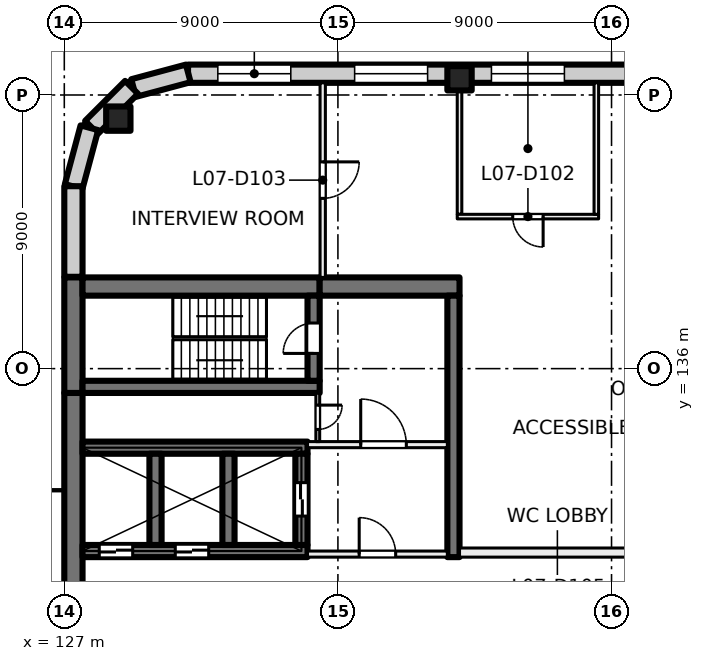
"""IFC4 building model, lengths in metres.
Left out: names, types, materials, properties, quantities, classifications, styles, units other than length and angle.
Written with IfcOpenShell. Run it as: python <this file> out.ifc"""

import sys

from ifc_helpers import new_model, si_unit, direction, frame, frame_2d, origin, origin_2d, place, context, subcontext, project, spatial, rectangle, extrude, element, fill, save


model = new_model("IFC4")
c1 = context("Model", 3, precision=1e-05, world=origin(), true_north=direction((0.0, 1.0)))
c2 = subcontext(c1, "Body", "Model", "MODEL_VIEW")
j1 = project(units=[si_unit("LENGTHUNIT", "METRE"), si_unit("PLANEANGLEUNIT", "RADIAN")], contexts=[c1])
p1 = place(None, origin())
s1 = spatial("IfcSite", under=j1, at=p1, CompositionType="ELEMENT")
p2 = place(p1, origin())
s2 = spatial("IfcBuilding", under=s1, at=p2, CompositionType="ELEMENT")
p3 = place(p2, frame((0.0, 0.0, 35.5)))
s3 = spatial("IfcBuildingStorey", under=s2, at=p3, CompositionType="ELEMENT", Elevation=35.5)
for number, where, z_axis, x_axis in (
    (1, (128.777, 144.223, 0.0), (0.0, 0.0, 1.0), (1.0, 0.0, 0.0)),
    (2, (140.0, 145.55, 0.0), (0.0, 0.0, 1.0), (1.0, 0.0, 0.0)),
):
    element("IfcColumn", number, at=place(p3, frame(where, z_axis=z_axis, x_axis=x_axis)), inside=s3, PredefinedType="COLUMN", context=c2, shape_type="SweptSolid", body=[
        extrude(rectangle(XDim=0.8, YDim=0.8, at=origin_2d()), origin(), (0.0, 0.0, 1.0), 4.0),
    ])
p4 = place(p3, frame((127.3, 120.8, 0.0), z_axis=(0.0, 0.0, 1.0), x_axis=(0.0, 1.0, 0.0)))
e3 = element("IfcWall", 3, at=p4, inside=s3, PredefinedType="SHEAR", context=c2, shape_type="SweptSolid", body=[
    extrude(rectangle(XDim=14.4, YDim=0.6, at=frame_2d((7.2, 0.0))), origin(), (0.0, 0.0, 1.0), 4.0),
])
p5 = place(p3, frame((127.3, 135.2, 0.0), z_axis=(0.0, 0.0, 1.0), x_axis=(0.0, 1.0, 0.0)))
e4 = element("IfcWall", 4, at=p5, inside=s3, PredefinedType="SHEAR", context=c2, shape_type="SweptSolid", body=[
    extrude(rectangle(XDim=3.8, YDim=0.6, at=frame_2d((1.9, 0.0))), origin(), (0.0, 0.0, 1.0), 4.0),
])
p6 = place(p3, frame((127.6, 138.7, 0.0), z_axis=(0.0, 0.0, 1.0), x_axis=(1.0, 0.0, 0.0)))
e5 = element("IfcWall", 5, at=p6, inside=s3, PredefinedType="SHEAR", context=c2, shape_type="SweptSolid", body=[
    extrude(rectangle(XDim=7.8, YDim=0.6, at=frame_2d((3.9, 0.0))), origin(), (0.0, 0.0, 1.0), 4.0),
])
p7 = place(p3, frame((135.4, 138.7, 0.0), z_axis=(0.0, 0.0, 1.0), x_axis=(1.0, 0.0, 0.0)))
e6 = element("IfcWall", 6, at=p7, inside=s3, PredefinedType="SHEAR", context=c2, shape_type="SweptSolid", body=[
    extrude(rectangle(XDim=4.6, YDim=0.6, at=frame_2d((2.3, 0.0))), origin(), (0.0, 0.0, 1.0), 4.0),
])
p8 = place(p3, frame((127.6, 135.4, 0.0), z_axis=(0.0, 0.0, 1.0), x_axis=(1.0, 0.0, 0.0)))
e7 = element("IfcWall", 7, at=p8, inside=s3, PredefinedType="SHEAR", context=c2, shape_type="SweptSolid", body=[
    extrude(rectangle(XDim=7.8, YDim=0.4, at=frame_2d((3.9, 0.0))), origin(), (0.0, 0.0, 1.0), 4.0),
])
p9 = place(p3, frame((135.2, 135.6, 0.0), z_axis=(0.0, 0.0, 1.0), x_axis=(0.0, 1.0, 0.0)))
e8 = element("IfcWall", 8, at=p9, inside=s3, PredefinedType="SHEAR", context=c2, shape_type="SweptSolid", body=[
    extrude(rectangle(XDim=2.8, YDim=0.4, at=frame_2d((1.4, 0.0))), origin(), (0.0, 0.0, 1.0), 4.0),
])
p10 = place(p9, frame((0.9, 0.0, 0.0)))
e9 = element("IfcOpeningElement", 9, at=p10, cuts=e8, PredefinedType="OPENING", context=c2, shape_type="SweptSolid", body=[
    extrude(rectangle(XDim=1.0, YDim=2.1, at=frame_2d((0.5, 1.05))), frame((0.0, 0.21, 0.0), z_axis=(0.0, -1.0, 0.0), x_axis=(1.0, 0.0, 0.0)), (0.0, 0.0, 1.0), 0.42),
])
p11 = place(p3, frame((127.6, 130.0, 0.0), z_axis=(0.0, 0.0, 1.0), x_axis=(1.0, 0.0, 0.0)))
e10 = element("IfcWall", 10, at=p11, inside=s3, PredefinedType="SHEAR", context=c2, shape_type="SweptSolid", body=[
    extrude(rectangle(XDim=7.4, YDim=0.4, at=frame_2d((3.7, 0.0))), origin(), (0.0, 0.0, 1.0), 4.0),
])
p12 = place(p11, frame((0.55, 0.0, 0.0)))
e11 = element("IfcOpeningElement", 11, at=p12, cuts=e10, PredefinedType="OPENING", context=c2, shape_type="SweptSolid", body=[
    extrude(rectangle(XDim=1.1, YDim=2.1, at=frame_2d((0.55, 1.05))), frame((0.0, 0.21, 0.0), z_axis=(0.0, -1.0, 0.0), x_axis=(1.0, 0.0, 0.0)), (0.0, 0.0, 1.0), 0.42),
])
p13 = place(p11, frame((3.05, 0.0, 0.0)))
e12 = element("IfcOpeningElement", 12, at=p13, cuts=e10, PredefinedType="OPENING", context=c2, shape_type="SweptSolid", body=[
    extrude(rectangle(XDim=1.1, YDim=2.1, at=frame_2d((0.55, 1.05))), frame((0.0, 0.21, 0.0), z_axis=(0.0, -1.0, 0.0), x_axis=(1.0, 0.0, 0.0)), (0.0, 0.0, 1.0), 0.42),
])
p14 = place(p3, frame((127.6, 133.4, 0.0), z_axis=(0.0, 0.0, 1.0), x_axis=(1.0, 0.0, 0.0)))
e13 = element("IfcWall", 13, at=p14, inside=s3, PredefinedType="SHEAR", context=c2, shape_type="SweptSolid", body=[
    extrude(rectangle(XDim=7.4, YDim=0.4, at=frame_2d((3.7, 0.0))), origin(), (0.0, 0.0, 1.0), 4.0),
])
for number, where, z_axis, x_axis in (
    (14, (130.0, 130.2, 0.0), (0.0, 0.0, 1.0), (0.0, 1.0, 0.0)),
    (15, (132.4, 130.2, 0.0), (0.0, 0.0, 1.0), (0.0, 1.0, 0.0)),
):
    element("IfcWall", number, at=place(p3, frame(where, z_axis=z_axis, x_axis=x_axis)), inside=s3, PredefinedType="SHEAR", context=c2, shape_type="SweptSolid", body=[
        extrude(rectangle(XDim=3.0, YDim=0.4, at=frame_2d((1.5, 0.0))), origin(), (0.0, 0.0, 1.0), 4.0),
    ])
p15 = place(p3, frame((134.8, 130.2, 0.0), z_axis=(0.0, 0.0, 1.0), x_axis=(0.0, 1.0, 0.0)))
e16 = element("IfcWall", 16, at=p15, inside=s3, PredefinedType="SHEAR", context=c2, shape_type="SweptSolid", body=[
    extrude(rectangle(XDim=3.0, YDim=0.4, at=frame_2d((1.5, 0.0))), origin(), (0.0, 0.0, 1.0), 4.0),
])
p16 = place(p15, frame((0.95, 0.0, 0.0)))
e17 = element("IfcOpeningElement", 17, at=p16, cuts=e16, PredefinedType="OPENING", context=c2, shape_type="SweptSolid", body=[
    extrude(rectangle(XDim=1.1, YDim=2.1, at=frame_2d((0.55, 1.05))), frame((0.0, 0.21, 0.0), z_axis=(0.0, -1.0, 0.0), x_axis=(1.0, 0.0, 0.0)), (0.0, 0.0, 1.0), 0.42),
])
p17 = place(p3, frame((139.8, 129.8, 0.0), z_axis=(0.0, 0.0, 1.0), x_axis=(0.0, 1.0, 0.0)))
e18 = element("IfcWall", 18, at=p17, inside=s3, PredefinedType="SHEAR", context=c2, shape_type="SweptSolid", body=[
    extrude(rectangle(XDim=8.6, YDim=0.4, at=frame_2d((4.3, 0.0))), origin(), (0.0, 0.0, 1.0), 4.0),
])
p18 = place(p3, frame((131.07, 145.7, 0.0), z_axis=(0.0, 0.0, 1.0), x_axis=(1.0, 0.0, 0.0)))
e19 = element("IfcWall", 19, at=p18, inside=s3, PredefinedType="SOLIDWALL", context=c2, shape_type="SweptSolid", body=[
    extrude(rectangle(XDim=31.93, YDim=0.6, at=frame_2d((15.965, 0.0))), origin(), (0.0, 0.0, 1.0), 3.625),
])
p19 = place(p18, frame((0.98, 0.0, 0.9)))
e20 = element("IfcOpeningElement", 20, at=p19, cuts=e19, PredefinedType="OPENING", context=c2, shape_type="SweptSolid", body=[
    extrude(rectangle(XDim=2.4, YDim=2.4, at=frame_2d((1.2, 1.2))), frame((0.0, 0.31, 0.0), z_axis=(0.0, -1.0, 0.0), x_axis=(1.0, 0.0, 0.0)), (0.0, 0.0, 1.0), 0.62),
])
p20 = place(p18, frame((5.48, 0.0, 0.9)))
e21 = element("IfcOpeningElement", 21, at=p20, cuts=e19, PredefinedType="OPENING", context=c2, shape_type="SweptSolid", body=[
    extrude(rectangle(XDim=2.4, YDim=2.4, at=frame_2d((1.2, 1.2))), frame((0.0, 0.31, 0.0), z_axis=(0.0, -1.0, 0.0), x_axis=(1.0, 0.0, 0.0)), (0.0, 0.0, 1.0), 0.62),
])
p21 = place(p18, frame((9.98, 0.0, 0.9)))
e22 = element("IfcOpeningElement", 22, at=p21, cuts=e19, PredefinedType="OPENING", context=c2, shape_type="SweptSolid", body=[
    extrude(rectangle(XDim=2.4, YDim=2.4, at=frame_2d((1.2, 1.2))), frame((0.0, 0.31, 0.0), z_axis=(0.0, -1.0, 0.0), x_axis=(1.0, 0.0, 0.0)), (0.0, 0.0, 1.0), 0.62),
])
p22 = place(p18, frame((14.48, 0.0, 0.9)))
e23 = element("IfcOpeningElement", 23, at=p22, cuts=e19, PredefinedType="OPENING", context=c2, shape_type="SweptSolid", body=[
    extrude(rectangle(XDim=2.4, YDim=2.4, at=frame_2d((1.2, 1.2))), frame((0.0, 0.31, 0.0), z_axis=(0.0, -1.0, 0.0), x_axis=(1.0, 0.0, 0.0)), (0.0, 0.0, 1.0), 0.62),
])
p23 = place(p18, frame((18.98, 0.0, 0.9)))
e24 = element("IfcOpeningElement", 24, at=p23, cuts=e19, PredefinedType="OPENING", context=c2, shape_type="SweptSolid", body=[
    extrude(rectangle(XDim=2.4, YDim=2.4, at=frame_2d((1.2, 1.2))), frame((0.0, 0.31, 0.0), z_axis=(0.0, -1.0, 0.0), x_axis=(1.0, 0.0, 0.0)), (0.0, 0.0, 1.0), 0.62),
])
p24 = place(p18, frame((23.48, 0.0, 0.9)))
e25 = element("IfcOpeningElement", 25, at=p24, cuts=e19, PredefinedType="OPENING", context=c2, shape_type="SweptSolid", body=[
    extrude(rectangle(XDim=2.4, YDim=2.4, at=frame_2d((1.2, 1.2))), frame((0.0, 0.31, 0.0), z_axis=(0.0, -1.0, 0.0), x_axis=(1.0, 0.0, 0.0)), (0.0, 0.0, 1.0), 0.62),
])
p25 = place(p18, frame((27.98, 0.0, 0.9)))
e26 = element("IfcOpeningElement", 26, at=p25, cuts=e19, PredefinedType="OPENING", context=c2, shape_type="SweptSolid", body=[
    extrude(rectangle(XDim=2.4, YDim=2.4, at=frame_2d((1.2, 1.2))), frame((0.0, 0.31, 0.0), z_axis=(0.0, -1.0, 0.0), x_axis=(1.0, 0.0, 0.0)), (0.0, 0.0, 1.0), 0.62),
])
for number, where, z_axis, x_axis in (
    (27, (129.281, 145.229, 0.0), (0.0, 0.0, 1.0), (0.966, 0.259, 0.0)),
    (28, (127.896, 143.936, 0.0), (0.0, 0.0, 1.0), (0.707, 0.707, 0.0)),
):
    element("IfcWall", number, at=place(p3, frame(where, z_axis=z_axis, x_axis=x_axis)), inside=s3, PredefinedType="SOLIDWALL", context=c2, shape_type="SweptSolid", body=[
        extrude(rectangle(XDim=1.861, YDim=0.6, at=frame_2d((0.93, 0.0))), origin(), (0.0, 0.0, 1.0), 3.625),
    ])
p26 = place(p3, frame((127.308, 141.99, 0.0), z_axis=(0.0, 0.0, 1.0), x_axis=(0.258839784042, 0.965920269068, 0.0)))
e29 = element("IfcWall", 29, at=p26, inside=s3, PredefinedType="SOLIDWALL", context=c2, shape_type="SweptSolid", body=[
    extrude(rectangle(XDim=2.0, YDim=0.6, at=frame_2d((1.0, 0.0))), origin(), (0.0, 0.0, 1.0), 3.625),
])
p27 = place(p3, frame((127.3, 139.02, 0.0), z_axis=(0.0, 0.0, 1.0), x_axis=(0.0, 1.0, 0.0)))
e30 = element("IfcWall", 30, at=p27, inside=s3, PredefinedType="SOLIDWALL", context=c2, shape_type="SweptSolid", body=[
    extrude(rectangle(XDim=2.98, YDim=0.6, at=frame_2d((1.49, 0.0))), origin(), (0.0, 0.0, 1.0), 3.625),
])
p28 = place(p3, frame((135.0, 129.9, 0.0), z_axis=(0.0, 0.0, 1.0), x_axis=(1.0, 0.0, 0.0)))
e31 = element("IfcWall", 31, at=p28, inside=s3, PredefinedType="PARTITIONING", context=c2, shape_type="SweptSolid", body=[
    extrude(rectangle(XDim=4.6, YDim=0.2, at=frame_2d((2.3, 0.0))), origin(), (0.0, 0.0, 1.0), 3.625),
])
p29 = place(p28, frame((1.7, 0.0, 0.0)))
e32 = element("IfcOpeningElement", 32, at=p29, cuts=e31, PredefinedType="OPENING", context=c2, shape_type="SweptSolid", body=[
    extrude(rectangle(XDim=1.2, YDim=2.1, at=frame_2d((0.6, 1.05))), frame((0.0, 0.11, 0.0), z_axis=(0.0, -1.0, 0.0), x_axis=(1.0, 0.0, 0.0)), (0.0, 0.0, 1.0), 0.22),
])
p30 = place(p3, frame((135.0, 133.5, 0.0), z_axis=(0.0, 0.0, 1.0), x_axis=(1.0, 0.0, 0.0)))
e33 = element("IfcWall", 33, at=p30, inside=s3, PredefinedType="PARTITIONING", context=c2, shape_type="SweptSolid", body=[
    extrude(rectangle(XDim=4.6, YDim=0.2, at=frame_2d((2.3, 0.0))), origin(), (0.0, 0.0, 1.0), 3.625),
])
p31 = place(p30, frame((1.75, 0.0, 0.0)))
e34 = element("IfcOpeningElement", 34, at=p31, cuts=e33, PredefinedType="OPENING", context=c2, shape_type="SweptSolid", body=[
    extrude(rectangle(XDim=1.5, YDim=2.1, at=frame_2d((0.75, 1.05))), frame((0.0, 0.11, 0.0), z_axis=(0.0, -1.0, 0.0), x_axis=(1.0, 0.0, 0.0)), (0.0, 0.0, 1.0), 0.22),
])
p32 = place(p3, frame((135.337, 135.2, 0.0), z_axis=(0.0, 0.0, 1.0), x_axis=(0.0, -1.0, 0.0)))
e35 = element("IfcWall", 35, at=p32, inside=s3, PredefinedType="PARTITIONING", context=c2, shape_type="SweptSolid", body=[
    extrude(rectangle(XDim=1.6, YDim=0.125, at=frame_2d((0.8, 0.0))), origin(), (0.0, 0.0, 1.0), 3.625),
])
p33 = place(p32, frame((0.4, 0.0, 0.0)))
e36 = element("IfcOpeningElement", 36, at=p33, cuts=e35, PredefinedType="OPENING", context=c2, shape_type="SweptSolid", body=[
    extrude(rectangle(XDim=0.8, YDim=2.1, at=frame_2d((0.4, 1.05))), frame((0.0, 0.073, 0.0), z_axis=(0.0, -1.0, 0.0), x_axis=(1.0, 0.0, 0.0)), (0.0, 0.0, 1.0), 0.145),
])
p34 = place(p3, frame((135.5, 145.4, 0.0), z_axis=(0.0, 0.0, 1.0), x_axis=(0.0, -1.0, 0.0)))
e37 = element("IfcWall", 37, at=p34, inside=s3, PredefinedType="PARTITIONING", context=c2, shape_type="SweptSolid", body=[
    extrude(rectangle(XDim=6.4, YDim=0.175, at=frame_2d((3.2, 0.0))), origin(), (0.0, 0.0, 1.0), 3.625),
])
p35 = place(p34, frame((2.6, 0.0, 0.0)))
e38 = element("IfcOpeningElement", 38, at=p35, cuts=e37, PredefinedType="OPENING", context=c2, shape_type="SweptSolid", body=[
    extrude(rectangle(XDim=1.2, YDim=2.1, at=frame_2d((0.6, 1.05))), frame((0.0, 0.097, 0.0), z_axis=(0.0, -1.0, 0.0), x_axis=(1.0, 0.0, 0.0)), (0.0, 0.0, 1.0), 0.195),
])
p36 = place(p3, frame((140.0, 129.95, 0.0), z_axis=(0.0, 0.0, 1.0), x_axis=(1.0, 0.0, 0.0)))
e39 = element("IfcWall", 39, at=p36, inside=s3, PredefinedType="PARTITIONING", context=c2, shape_type="SweptSolid", body=[
    extrude(rectangle(XDim=14.0, YDim=0.3, at=frame_2d((7.0, 0.0))), origin(), (0.0, 0.0, 1.0), 3.625),
])
p37 = place(p36, frame((6.1, 0.0, 0.0)))
e40 = element("IfcOpeningElement", 40, at=p37, cuts=e39, PredefinedType="OPENING", context=c2, shape_type="SweptSolid", body=[
    extrude(rectangle(XDim=1.8, YDim=2.1, at=frame_2d((0.9, 1.05))), frame((0.0, 0.16, 0.0), z_axis=(0.0, -1.0, 0.0), x_axis=(1.0, 0.0, 0.0)), (0.0, 0.0, 1.0), 0.32),
])
p38 = place(p3, frame((140.0, 141.075, 0.0), z_axis=(0.0, 0.0, 1.0), x_axis=(0.0, 1.0, 0.0)))
e41 = element("IfcWall", 41, at=p38, inside=s3, PredefinedType="PARTITIONING", context=c2, shape_type="SweptSolid", body=[
    extrude(rectangle(XDim=4.325, YDim=0.15, at=frame_2d((2.163, 0.0))), origin(), (0.0, 0.0, 1.0), 3.625),
])
p39 = place(p3, frame((144.575, 141.0, 0.0), z_axis=(0.0, 0.0, 1.0), x_axis=(-1.0, 0.0, 0.0)))
e42 = element("IfcWall", 42, at=p39, inside=s3, PredefinedType="PARTITIONING", context=c2, shape_type="SweptSolid", body=[
    extrude(rectangle(XDim=4.65, YDim=0.15, at=frame_2d((2.325, 0.0))), origin(), (0.0, 0.0, 1.0), 3.625),
])
p40 = place(p39, frame((1.825, 0.0, 0.0)))
e43 = element("IfcOpeningElement", 43, at=p40, cuts=e42, PredefinedType="OPENING", context=c2, shape_type="SweptSolid", body=[
    extrude(rectangle(XDim=1.0, YDim=2.1, at=frame_2d((0.5, 1.05))), frame((0.0, 0.085, 0.0), z_axis=(0.0, -1.0, 0.0), x_axis=(1.0, 0.0, 0.0)), (0.0, 0.0, 1.0), 0.17),
])
p41 = place(p3, frame((144.5, 145.4, 0.0), z_axis=(0.0, 0.0, 1.0), x_axis=(0.0, -1.0, 0.0)))
e44 = element("IfcWall", 44, at=p41, inside=s3, PredefinedType="PARTITIONING", context=c2, shape_type="SweptSolid", body=[
    extrude(rectangle(XDim=4.325, YDim=0.15, at=frame_2d((2.163, 0.0))), origin(), (0.0, 0.0, 1.0), 3.625),
])
p42 = place(p19, origin())
e45 = element("IfcWindow", 45, at=p42, inside=s3, PartitioningType="SINGLE_PANEL", PredefinedType="WINDOW", context=c2, shape_type="SweptSolid", body=[
    extrude(rectangle(XDim=2.4, YDim=2.4, at=frame_2d((1.2, 1.2))), frame((0.0, 0.03, 0.0), z_axis=(0.0, -1.0, 0.0), x_axis=(1.0, 0.0, 0.0)), (0.0, 0.0, 1.0), 0.06),
])
fill(e20, e45)
p43 = place(p20, origin())
e46 = element("IfcWindow", 46, at=p43, inside=s3, PartitioningType="SINGLE_PANEL", PredefinedType="WINDOW", context=c2, shape_type="SweptSolid", body=[
    extrude(rectangle(XDim=2.4, YDim=2.4, at=frame_2d((1.2, 1.2))), frame((0.0, 0.03, 0.0), z_axis=(0.0, -1.0, 0.0), x_axis=(1.0, 0.0, 0.0)), (0.0, 0.0, 1.0), 0.06),
])
fill(e21, e46)
p44 = place(p21, origin())
e47 = element("IfcWindow", 47, at=p44, inside=s3, PartitioningType="SINGLE_PANEL", PredefinedType="WINDOW", context=c2, shape_type="SweptSolid", body=[
    extrude(rectangle(XDim=2.4, YDim=2.4, at=frame_2d((1.2, 1.2))), frame((0.0, 0.03, 0.0), z_axis=(0.0, -1.0, 0.0), x_axis=(1.0, 0.0, 0.0)), (0.0, 0.0, 1.0), 0.06),
])
fill(e22, e47)
p45 = place(p12, origin())
e48 = element("IfcDoor", 48, at=p45, inside=s3, OperationType="DOUBLE_DOOR_SLIDING", PredefinedType="DOOR", context=c2, shape_type="SweptSolid", body=[
    extrude(rectangle(XDim=1.1, YDim=2.1, at=frame_2d((0.55, 1.05))), frame((0.0, 0.025, 0.0), z_axis=(0.0, -1.0, 0.0), x_axis=(1.0, 0.0, 0.0)), (0.0, 0.0, 1.0), 0.05),
])
fill(e11, e48)
p46 = place(p13, origin())
e49 = element("IfcDoor", 49, at=p46, inside=s3, OperationType="DOUBLE_DOOR_SLIDING", PredefinedType="DOOR", context=c2, shape_type="SweptSolid", body=[
    extrude(rectangle(XDim=1.1, YDim=2.1, at=frame_2d((0.55, 1.05))), frame((0.0, 0.025, 0.0), z_axis=(0.0, -1.0, 0.0), x_axis=(1.0, 0.0, 0.0)), (0.0, 0.0, 1.0), 0.05),
])
fill(e12, e49)
p47 = place(p29, origin())
e50 = element("IfcDoor", 50, at=p47, inside=s3, OperationType="DOUBLE_DOOR_SINGLE_SWING", PredefinedType="DOOR", context=c2, shape_type="SweptSolid", body=[
    extrude(rectangle(XDim=1.2, YDim=2.1, at=frame_2d((0.6, 1.05))), frame((0.0, 0.025, 0.0), z_axis=(0.0, -1.0, 0.0), x_axis=(1.0, 0.0, 0.0)), (0.0, 0.0, 1.0), 0.05),
])
fill(e32, e50)
p48 = place(p31, origin())
e51 = element("IfcDoor", 51, at=p48, inside=s3, OperationType="DOUBLE_DOOR_SINGLE_SWING", PredefinedType="DOOR", context=c2, shape_type="SweptSolid", body=[
    extrude(rectangle(XDim=1.5, YDim=2.1, at=frame_2d((0.75, 1.05))), frame((0.0, 0.025, 0.0), z_axis=(0.0, -1.0, 0.0), x_axis=(1.0, 0.0, 0.0)), (0.0, 0.0, 1.0), 0.05),
])
fill(e34, e51)
p49 = place(p10, origin())
e52 = element("IfcDoor", 52, at=p49, inside=s3, OperationType="SINGLE_SWING_LEFT", PredefinedType="DOOR", context=c2, shape_type="SweptSolid", body=[
    extrude(rectangle(XDim=1.0, YDim=2.1, at=frame_2d((0.5, 1.05))), frame((0.0, 0.025, 0.0), z_axis=(0.0, -1.0, 0.0), x_axis=(1.0, 0.0, 0.0)), (0.0, 0.0, 1.0), 0.05),
])
fill(e9, e52)
p50 = place(p33, origin())
e53 = element("IfcDoor", 53, at=p50, inside=s3, OperationType="SINGLE_SWING_RIGHT", PredefinedType="DOOR", context=c2, shape_type="SweptSolid", body=[
    extrude(rectangle(XDim=0.8, YDim=2.1, at=frame_2d((0.4, 1.05))), frame((0.0, 0.025, 0.0), z_axis=(0.0, -1.0, 0.0), x_axis=(1.0, 0.0, 0.0)), (0.0, 0.0, 1.0), 0.05),
])
fill(e36, e53)
p51 = place(p16, origin())
e54 = element("IfcDoor", 54, at=p51, inside=s3, OperationType="DOUBLE_DOOR_SLIDING", PredefinedType="DOOR", context=c2, shape_type="SweptSolid", body=[
    extrude(rectangle(XDim=1.1, YDim=2.1, at=frame_2d((0.55, 1.05))), frame((0.0, 0.025, 0.0), z_axis=(0.0, -1.0, 0.0), x_axis=(1.0, 0.0, 0.0)), (0.0, 0.0, 1.0), 0.05),
])
fill(e17, e54)
p52 = place(p40, origin())
e55 = element("IfcDoor", 55, at=p52, inside=s3, OperationType="SINGLE_SWING_LEFT", PredefinedType="DOOR", context=c2, shape_type="SweptSolid", body=[
    extrude(rectangle(XDim=1.0, YDim=2.1, at=frame_2d((0.5, 1.05))), frame((0.0, 0.025, 0.0), z_axis=(0.0, -1.0, 0.0), x_axis=(1.0, 0.0, 0.0)), (0.0, 0.0, 1.0), 0.05),
])
fill(e43, e55)
p53 = place(p35, origin())
e56 = element("IfcDoor", 56, at=p53, inside=s3, OperationType="DOUBLE_DOOR_SINGLE_SWING", PredefinedType="DOOR", context=c2, shape_type="SweptSolid", body=[
    extrude(rectangle(XDim=1.2, YDim=2.1, at=frame_2d((0.6, 1.05))), frame((0.0, 0.025, 0.0), z_axis=(0.0, -1.0, 0.0), x_axis=(1.0, 0.0, 0.0)), (0.0, 0.0, 1.0), 0.05),
])
fill(e38, e56)
save(model, sys.argv[1])
